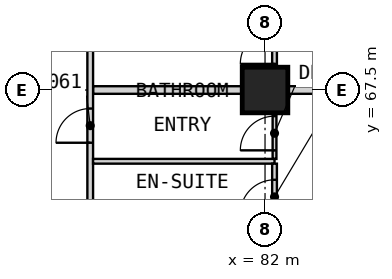
"""IFC4 building model, lengths in metres.
Left out: names, types, materials, properties, quantities, classifications, styles, units other than length and angle.
Written with IfcOpenShell. Run it as: python <this file> out.ifc"""

import sys

from ifc_helpers import new_model, si_unit, direction, frame, frame_2d, origin, origin_2d, place, context, subcontext, project, spatial, rectangle, extrude, element, fill, save


model = new_model("IFC4")
c1 = context("Model", 3, precision=1e-05, world=origin(), true_north=direction((0.0, 1.0)))
c2 = subcontext(c1, "Body", "Model", "MODEL_VIEW")
j1 = project(units=[si_unit("LENGTHUNIT", "METRE"), si_unit("PLANEANGLEUNIT", "RADIAN")], contexts=[c1])
p1 = place(None, origin())
s1 = spatial("IfcSite", under=j1, at=p1, CompositionType="ELEMENT")
p2 = place(p1, origin())
s2 = spatial("IfcBuilding", under=s1, at=p2, CompositionType="ELEMENT")
p3 = place(p2, frame((0.0, 0.0, 48.4)))
s3 = spatial("IfcBuildingStorey", under=s2, at=p3, CompositionType="ELEMENT", Elevation=48.4)
p4 = place(p3, frame((82.0, 67.5, 0.0), z_axis=(0.0, 0.0, 1.0), x_axis=(1.0, 0.0, 0.0)))
e1 = element("IfcColumn", 1, at=p4, inside=s3, PredefinedType="COLUMN", context=c2, shape_type="SweptSolid", body=[
    extrude(rectangle(XDim=1.2, YDim=1.2, at=origin_2d()), origin(), (0.0, 0.0, 1.0), 3.6),
])
p5 = place(p3, frame((77.475, 67.5, 0.0), z_axis=(0.0, 0.0, 1.0), x_axis=(1.0, 0.0, 0.0)))
e2 = element("IfcWall", 2, at=p5, inside=s3, PredefinedType="PARTITIONING", context=c2, shape_type="SweptSolid", body=[
    extrude(rectangle(XDim=12.525, YDim=0.2, at=frame_2d((6.262, 0.0))), origin(), (0.0, 0.0, 1.0), 3.35),
])
p6 = place(p3, frame((77.4, 50.175, 0.0), z_axis=(0.0, 0.0, 1.0), x_axis=(0.0, 1.0, 0.0)))
e3 = element("IfcWall", 3, at=p6, inside=s3, PredefinedType="PARTITIONING", context=c2, shape_type="SweptSolid", body=[
    extrude(rectangle(XDim=42.15, YDim=0.15, at=frame_2d((21.075, 0.0))), origin(), (0.0, 0.0, 1.0), 3.35),
])
p7 = place(p6, frame((4.688, 0.0, 0.0)))
e4 = element("IfcOpeningElement", 4, at=p7, cuts=e3, PredefinedType="OPENING", context=c2, shape_type="SweptSolid", body=[
    extrude(rectangle(XDim=0.9, YDim=2.1, at=frame_2d((0.45, 1.05))), frame((0.0, 0.085, 0.0), z_axis=(0.0, -1.0, 0.0), x_axis=(1.0, 0.0, 0.0)), (0.0, 0.0, 1.0), 0.17),
])
p8 = place(p6, frame((8.438, 0.0, 0.0)))
e5 = element("IfcOpeningElement", 5, at=p8, cuts=e3, PredefinedType="OPENING", context=c2, shape_type="SweptSolid", body=[
    extrude(rectangle(XDim=0.9, YDim=2.1, at=frame_2d((0.45, 1.05))), frame((0.0, 0.085, 0.0), z_axis=(0.0, -1.0, 0.0), x_axis=(1.0, 0.0, 0.0)), (0.0, 0.0, 1.0), 0.17),
])
p9 = place(p6, frame((12.188, 0.0, 0.0)))
e6 = element("IfcOpeningElement", 6, at=p9, cuts=e3, PredefinedType="OPENING", context=c2, shape_type="SweptSolid", body=[
    extrude(rectangle(XDim=0.9, YDim=2.1, at=frame_2d((0.45, 1.05))), frame((0.0, 0.085, 0.0), z_axis=(0.0, -1.0, 0.0), x_axis=(1.0, 0.0, 0.0)), (0.0, 0.0, 1.0), 0.17),
])
p10 = place(p6, frame((15.938, 0.0, 0.0)))
e7 = element("IfcOpeningElement", 7, at=p10, cuts=e3, PredefinedType="OPENING", context=c2, shape_type="SweptSolid", body=[
    extrude(rectangle(XDim=0.9, YDim=2.1, at=frame_2d((0.45, 1.05))), frame((0.0, 0.085, 0.0), z_axis=(0.0, -1.0, 0.0), x_axis=(1.0, 0.0, 0.0)), (0.0, 0.0, 1.0), 0.17),
])
p11 = place(p6, frame((19.688, 0.0, 0.0)))
e8 = element("IfcOpeningElement", 8, at=p11, cuts=e3, PredefinedType="OPENING", context=c2, shape_type="SweptSolid", body=[
    extrude(rectangle(XDim=0.9, YDim=2.1, at=frame_2d((0.45, 1.05))), frame((0.0, 0.085, 0.0), z_axis=(0.0, -1.0, 0.0), x_axis=(1.0, 0.0, 0.0)), (0.0, 0.0, 1.0), 0.17),
])
p12 = place(p6, frame((23.438, 0.0, 0.0)))
e9 = element("IfcOpeningElement", 9, at=p12, cuts=e3, PredefinedType="OPENING", context=c2, shape_type="SweptSolid", body=[
    extrude(rectangle(XDim=0.9, YDim=2.1, at=frame_2d((0.45, 1.05))), frame((0.0, 0.085, 0.0), z_axis=(0.0, -1.0, 0.0), x_axis=(1.0, 0.0, 0.0)), (0.0, 0.0, 1.0), 0.17),
])
p13 = place(p6, frame((27.188, 0.0, 0.0)))
e10 = element("IfcOpeningElement", 10, at=p13, cuts=e3, PredefinedType="OPENING", context=c2, shape_type="SweptSolid", body=[
    extrude(rectangle(XDim=0.9, YDim=2.1, at=frame_2d((0.45, 1.05))), frame((0.0, 0.085, 0.0), z_axis=(0.0, -1.0, 0.0), x_axis=(1.0, 0.0, 0.0)), (0.0, 0.0, 1.0), 0.17),
])
p14 = place(p6, frame((30.938, 0.0, 0.0)))
e11 = element("IfcOpeningElement", 11, at=p14, cuts=e3, PredefinedType="OPENING", context=c2, shape_type="SweptSolid", body=[
    extrude(rectangle(XDim=0.9, YDim=2.1, at=frame_2d((0.45, 1.05))), frame((0.0, 0.085, 0.0), z_axis=(0.0, -1.0, 0.0), x_axis=(1.0, 0.0, 0.0)), (0.0, 0.0, 1.0), 0.17),
])
p15 = place(p6, frame((34.688, 0.0, 0.0)))
e12 = element("IfcOpeningElement", 12, at=p15, cuts=e3, PredefinedType="OPENING", context=c2, shape_type="SweptSolid", body=[
    extrude(rectangle(XDim=0.9, YDim=2.1, at=frame_2d((0.45, 1.05))), frame((0.0, 0.085, 0.0), z_axis=(0.0, -1.0, 0.0), x_axis=(1.0, 0.0, 0.0)), (0.0, 0.0, 1.0), 0.17),
])
p16 = place(p6, frame((38.438, 0.0, 0.0)))
e13 = element("IfcOpeningElement", 13, at=p16, cuts=e3, PredefinedType="OPENING", context=c2, shape_type="SweptSolid", body=[
    extrude(rectangle(XDim=0.9, YDim=2.1, at=frame_2d((0.45, 1.05))), frame((0.0, 0.085, 0.0), z_axis=(0.0, -1.0, 0.0), x_axis=(1.0, 0.0, 0.0)), (0.0, 0.0, 1.0), 0.17),
])
p17 = place(p3, frame((82.25, 65.688, 0.0), z_axis=(0.0, 0.0, 1.0), x_axis=(0.0, 1.0, 0.0)))
e14 = element("IfcWall", 14, at=p17, inside=s3, PredefinedType="PARTITIONING", context=c2, shape_type="SweptSolid", body=[
    extrude(rectangle(XDim=1.712, YDim=0.1, at=frame_2d((0.856, 0.0))), origin(), (0.0, 0.0, 1.0), 3.35),
])
p18 = place(p17, frame((0.225, 0.0, 0.0)))
e15 = element("IfcOpeningElement", 15, at=p18, cuts=e14, PredefinedType="OPENING", context=c2, shape_type="SweptSolid", body=[
    extrude(rectangle(XDim=0.9, YDim=2.1, at=frame_2d((0.45, 1.05))), frame((0.0, 0.06, 0.0), z_axis=(0.0, -1.0, 0.0), x_axis=(1.0, 0.0, 0.0)), (0.0, 0.0, 1.0), 0.12),
])
p19 = place(p3, frame((77.475, 65.625, 0.0), z_axis=(0.0, 0.0, 1.0), x_axis=(1.0, 0.0, 0.0)))
e16 = element("IfcWall", 16, at=p19, inside=s3, PredefinedType="PARTITIONING", context=c2, shape_type="SweptSolid", body=[
    extrude(rectangle(XDim=4.775, YDim=0.125, at=frame_2d((2.387, 0.0))), origin(), (0.0, 0.0, 1.0), 3.35),
])
p20 = place(p3, frame((82.25, 63.85, 0.0), z_axis=(0.0, 0.0, 1.0), x_axis=(0.0, 1.0, 0.0)))
e17 = element("IfcWall", 17, at=p20, inside=s3, PredefinedType="PARTITIONING", context=c2, shape_type="SweptSolid", body=[
    extrude(rectangle(XDim=1.712, YDim=0.125, at=frame_2d((0.856, 0.0))), origin(), (0.0, 0.0, 1.0), 3.35),
])
p21 = place(p20, frame((0.387, 0.0, 0.0)))
e18 = element("IfcOpeningElement", 18, at=p21, cuts=e17, PredefinedType="OPENING", context=c2, shape_type="SweptSolid", body=[
    extrude(rectangle(XDim=0.9, YDim=2.1, at=frame_2d((0.45, 1.05))), frame((0.0, 0.073, 0.0), z_axis=(0.0, -1.0, 0.0), x_axis=(1.0, 0.0, 0.0)), (0.0, 0.0, 1.0), 0.145),
])
p22 = place(p3, frame((82.25, 67.6, 0.0), z_axis=(0.0, 0.0, 1.0), x_axis=(0.0, 1.0, 0.0)))
e19 = element("IfcWall", 19, at=p22, inside=s3, PredefinedType="PARTITIONING", context=c2, shape_type="SweptSolid", body=[
    extrude(rectangle(XDim=1.712, YDim=0.125, at=frame_2d((0.856, 0.0))), origin(), (0.0, 0.0, 1.0), 3.35),
])
p23 = place(p22, frame((0.587, 0.0, 0.0)))
e20 = element("IfcOpeningElement", 20, at=p23, cuts=e19, PredefinedType="OPENING", context=c2, shape_type="SweptSolid", body=[
    extrude(rectangle(XDim=0.9, YDim=2.1, at=frame_2d((0.45, 1.05))), frame((0.0, 0.073, 0.0), z_axis=(0.0, -1.0, 0.0), x_axis=(1.0, 0.0, 0.0)), (0.0, 0.0, 1.0), 0.145),
])
p24 = place(p21, origin())
e21 = element("IfcDoor", 21, at=p24, inside=s3, OperationType="SINGLE_SWING_LEFT", PredefinedType="DOOR", context=c2, shape_type="SweptSolid", body=[
    extrude(rectangle(XDim=0.9, YDim=2.1, at=frame_2d((0.45, 1.05))), frame((0.0, 0.025, 0.0), z_axis=(0.0, -1.0, 0.0), x_axis=(1.0, 0.0, 0.0)), (0.0, 0.0, 1.0), 0.05),
])
fill(e18, e21)
p25 = place(p10, origin())
e22 = element("IfcDoor", 22, at=p25, inside=s3, OperationType="SINGLE_SWING_RIGHT", PredefinedType="DOOR", context=c2, shape_type="SweptSolid", body=[
    extrude(rectangle(XDim=0.9, YDim=2.1, at=frame_2d((0.45, 1.05))), frame((0.0, 0.025, 0.0), z_axis=(0.0, -1.0, 0.0), x_axis=(1.0, 0.0, 0.0)), (0.0, 0.0, 1.0), 0.05),
])
fill(e7, e22)
p26 = place(p18, origin())
e23 = element("IfcDoor", 23, at=p26, inside=s3, OperationType="SINGLE_SWING_LEFT", PredefinedType="DOOR", context=c2, shape_type="SweptSolid", body=[
    extrude(rectangle(XDim=0.9, YDim=2.1, at=frame_2d((0.45, 1.05))), frame((0.0, 0.025, 0.0), z_axis=(0.0, -1.0, 0.0), x_axis=(1.0, 0.0, 0.0)), (0.0, 0.0, 1.0), 0.05),
])
fill(e15, e23)
p27 = place(p23, origin())
e24 = element("IfcDoor", 24, at=p27, inside=s3, OperationType="SINGLE_SWING_RIGHT", PredefinedType="DOOR", context=c2, shape_type="SweptSolid", body=[
    extrude(rectangle(XDim=0.9, YDim=2.1, at=frame_2d((0.45, 1.05))), frame((0.0, 0.025, 0.0), z_axis=(0.0, -1.0, 0.0), x_axis=(1.0, 0.0, 0.0)), (0.0, 0.0, 1.0), 0.05),
])
fill(e20, e24)
save(model, sys.argv[1])
